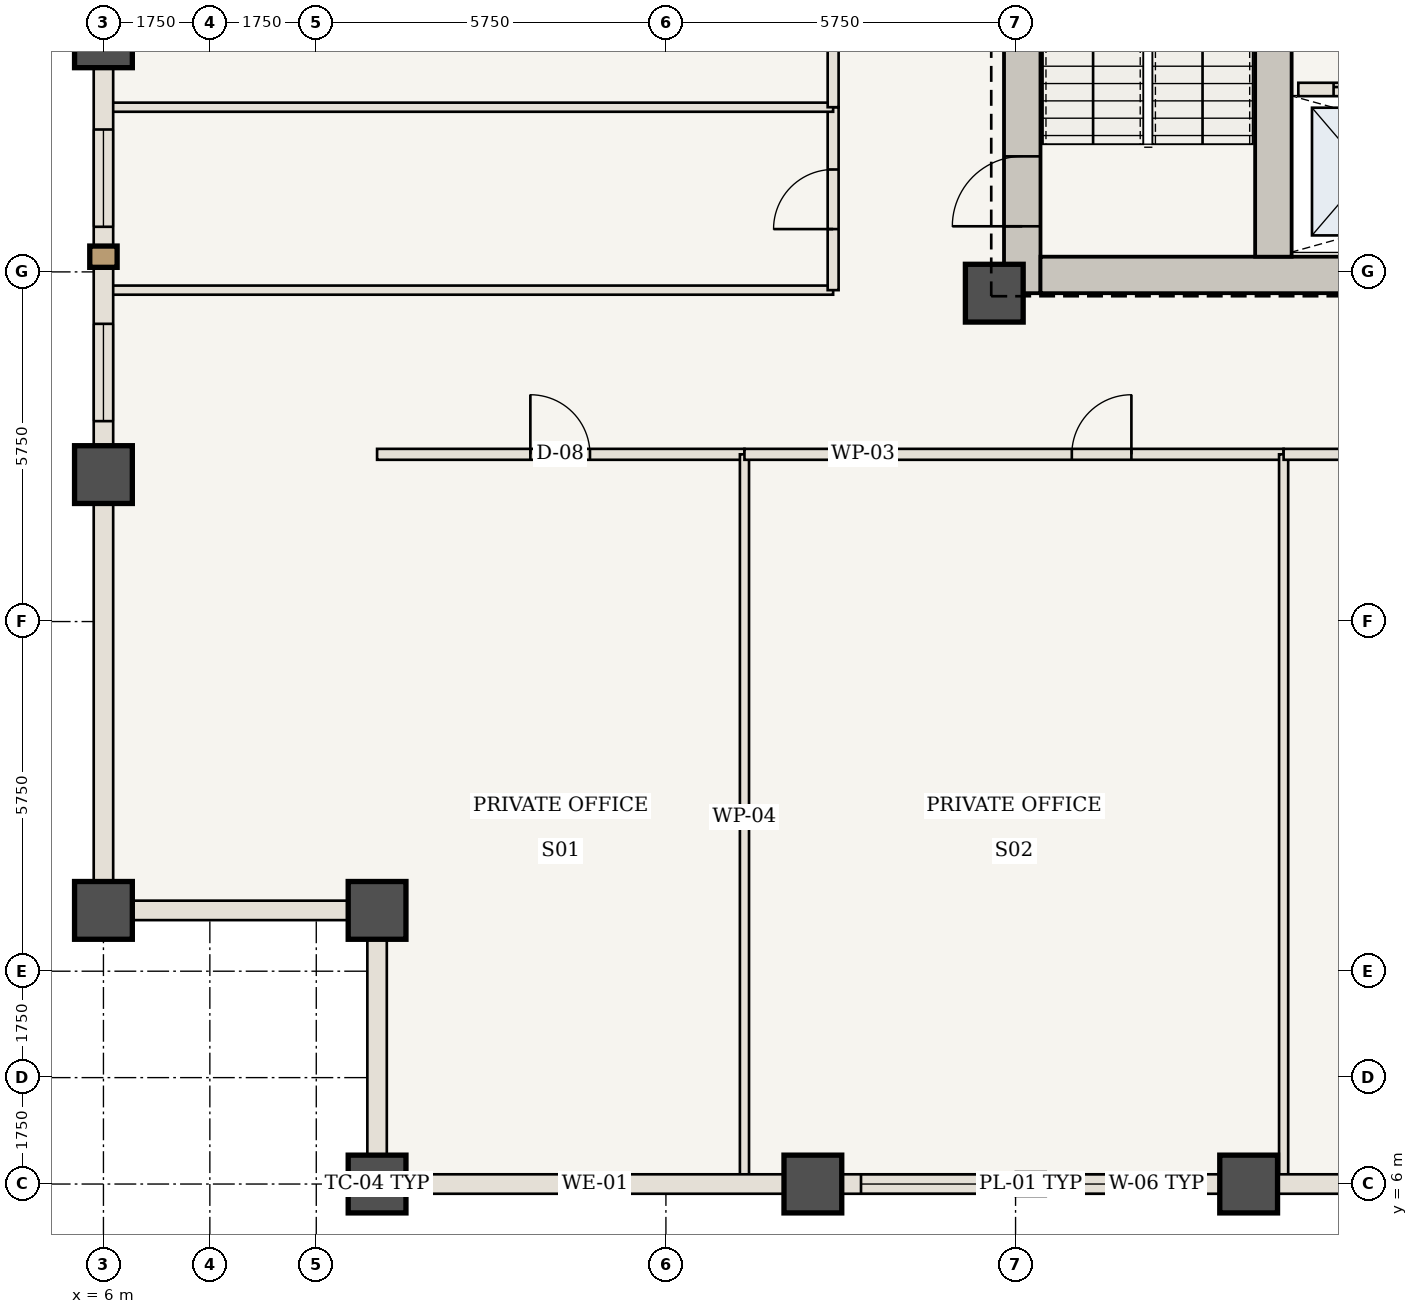
"""IFC4 building model, lengths in metres.
Left out: names, types, materials, properties, quantities, classifications, styles, units other than length and angle.
Written with IfcOpenShell. Run it as: python <this file> out.ifc"""

import sys

from ifc_helpers import new_model, si_unit, direction, frame, frame_2d, origin, origin_2d, place, context, subcontext, project, spatial, rectangle, extrude, element, fill, save


model = new_model("IFC4")
c1 = context("Model", 3, precision=1e-05, world=origin(), true_north=direction((0.0, 1.0)))
c2 = subcontext(c1, "Body", "Model", "MODEL_VIEW")
j1 = project(units=[si_unit("LENGTHUNIT", "METRE"), si_unit("PLANEANGLEUNIT", "RADIAN")], contexts=[c1])
p1 = place(None, origin())
s1 = spatial("IfcSite", under=j1, at=p1, CompositionType="ELEMENT")
p2 = place(p1, origin())
s2 = spatial("IfcBuilding", under=s1, at=p2, CompositionType="ELEMENT")
p3 = place(p2, frame((0.0, 0.0, 129.85)))
s3 = spatial("IfcBuildingStorey", under=s2, at=p3, CompositionType="ELEMENT", Elevation=129.85)
p4 = place(p3, frame((21.11, 20.65, 0.0), z_axis=(0.0, 0.0, 1.0), x_axis=(0.0, 1.0, 0.0)))
e1 = element("IfcWall", 1, at=p4, inside=s3, PredefinedType="SHEAR", context=c2, shape_type="SweptSolid", body=[
    extrude(rectangle(XDim=9.95, YDim=0.6, at=frame_2d((4.975, 0.0))), origin(), (0.0, 0.0, 1.0), 3.85),
])
p5 = place(p4, frame((1.1, 0.0, 0.0)))
e2 = element("IfcOpeningElement", 2, at=p5, cuts=e1, PredefinedType="OPENING", context=c2, shape_type="SweptSolid", body=[
    extrude(rectangle(XDim=1.15, YDim=2.15, at=frame_2d((0.575, 1.075))), frame((0.0, 0.31, 0.0), z_axis=(0.0, -1.0, 0.0), x_axis=(1.0, 0.0, 0.0)), (0.0, 0.0, 1.0), 0.62),
])
p6 = place(p3, frame((21.41, 20.95, 0.0), z_axis=(0.0, 0.0, 1.0), x_axis=(1.0, 0.0, 0.0)))
e3 = element("IfcWall", 3, at=p6, inside=s3, PredefinedType="SHEAR", context=c2, shape_type="SweptSolid", body=[
    extrude(rectangle(XDim=13.74, YDim=0.6, at=frame_2d((6.87, 0.0))), origin(), (0.0, 0.0, 1.0), 3.85),
])
p7 = place(p3, frame((25.24, 21.25, 0.0), z_axis=(0.0, 0.0, 1.0), x_axis=(0.0, 1.0, 0.0)))
e4 = element("IfcWall", 4, at=p7, inside=s3, PredefinedType="SHEAR", context=c2, shape_type="SweptSolid", body=[
    extrude(rectangle(XDim=9.35, YDim=0.6, at=frame_2d((4.675, 0.0))), origin(), (0.0, 0.0, 1.0), 3.85),
])
for number, where, z_axis, x_axis in (
    (5, (20.65, 20.65, 0.0), (0.0, 0.0, 1.0), (1.0, 0.0, 0.0)),
    (6, (10.5, 6.0, 0.0), (0.0, 0.0, 1.0), (1.0, 0.0, 0.0)),
    (7, (10.5, 10.5, 0.0), (0.0, 0.0, 1.0), (1.0, 0.0, 0.0)),
    (8, (6.0, 10.5, 0.0), (0.0, 0.0, 1.0), (1.0, 0.0, 0.0)),
    (9, (17.667, 6.0, 0.0), (0.0, 0.0, 1.0), (1.0, 0.0, 0.0)),
    (10, (6.0, 17.667, 0.0), (0.0, 0.0, 1.0), (1.0, 0.0, 0.0)),
    (11, (24.833, 6.0, 0.0), (0.0, 0.0, 1.0), (1.0, 0.0, 0.0)),
    (12, (6.0, 24.833, 0.0), (0.0, 0.0, 1.0), (1.0, 0.0, 0.0)),
):
    element("IfcColumn", number, at=place(p3, frame(where, z_axis=z_axis, x_axis=x_axis)), inside=s3, PredefinedType="COLUMN", context=c2, shape_type="SweptSolid", body=[
        extrude(rectangle(XDim=0.95, YDim=0.95, at=origin_2d()), origin(), (0.0, 0.0, 1.0), 3.85),
    ])
p8 = place(p3, frame((25.65, 24.0, 0.0), z_axis=(0.0, 0.0, 1.0), x_axis=(1.0, 0.0, 0.0)))
e13 = element("IfcWall", 13, at=p8, inside=s3, PredefinedType="STANDARD", context=c2, shape_type="SweptSolid", body=[
    extrude(rectangle(XDim=9.25, YDim=0.22, at=frame_2d((4.625, 0.0))), origin(), (0.0, 0.0, 1.0), 3.685),
])
p9 = place(p8, frame((0.58, 0.0, 0.0)))
e14 = element("IfcOpeningElement", 14, at=p9, cuts=e13, PredefinedType="OPENING", context=c2, shape_type="SweptSolid", body=[
    extrude(rectangle(XDim=1.1, YDim=2.15, at=frame_2d((0.55, 1.075))), frame((0.0, 0.12, 0.0), z_axis=(0.0, -1.0, 0.0), x_axis=(1.0, 0.0, 0.0)), (0.0, 0.0, 1.0), 0.24),
])
p10 = place(p8, frame((2.75, 0.0, 0.0)))
e15 = element("IfcOpeningElement", 15, at=p10, cuts=e13, PredefinedType="OPENING", context=c2, shape_type="SweptSolid", body=[
    extrude(rectangle(XDim=1.1, YDim=2.15, at=frame_2d((0.55, 1.075))), frame((0.0, 0.12, 0.0), z_axis=(0.0, -1.0, 0.0), x_axis=(1.0, 0.0, 0.0)), (0.0, 0.0, 1.0), 0.24),
])
p11 = place(p8, frame((5.05, 0.0, 0.0)))
e16 = element("IfcOpeningElement", 16, at=p11, cuts=e13, PredefinedType="OPENING", context=c2, shape_type="SweptSolid", body=[
    extrude(rectangle(XDim=1.1, YDim=2.15, at=frame_2d((0.55, 1.075))), frame((0.0, 0.12, 0.0), z_axis=(0.0, -1.0, 0.0), x_axis=(1.0, 0.0, 0.0)), (0.0, 0.0, 1.0), 0.24),
])
p12 = place(p8, frame((7.35, 0.0, 0.0)))
e17 = element("IfcOpeningElement", 17, at=p12, cuts=e13, PredefinedType="OPENING", context=c2, shape_type="SweptSolid", body=[
    extrude(rectangle(XDim=1.1, YDim=2.15, at=frame_2d((0.55, 1.075))), frame((0.0, 0.12, 0.0), z_axis=(0.0, -1.0, 0.0), x_axis=(1.0, 0.0, 0.0)), (0.0, 0.0, 1.0), 0.24),
])
p13 = place(p3, frame((10.5, 18.0, 0.0), z_axis=(0.0, 0.0, 1.0), x_axis=(1.0, 0.0, 0.0)))
e18 = element("IfcWall", 18, at=p13, inside=s3, PredefinedType="STANDARD", context=c2, shape_type="SweptSolid", body=[
    extrude(rectangle(XDim=6.042, YDim=0.18, at=frame_2d((3.021, 0.0))), origin(), (0.0, 0.0, 1.0), 3.685),
])
p14 = place(p13, frame((2.521, 0.0, 0.0)))
e19 = element("IfcOpeningElement", 19, at=p14, cuts=e18, PredefinedType="OPENING", context=c2, shape_type="SweptSolid", body=[
    extrude(rectangle(XDim=0.98, YDim=2.2, at=frame_2d((0.49, 1.1))), frame((0.0, 0.1, 0.0), z_axis=(0.0, -1.0, 0.0), x_axis=(1.0, 0.0, 0.0)), (0.0, 0.0, 1.0), 0.2),
])
p15 = place(p3, frame((16.542, 6.06, 0.0), z_axis=(0.0, 0.0, 1.0), x_axis=(0.0, 1.0, 0.0)))
e20 = element("IfcWall", 20, at=p15, inside=s3, PredefinedType="STANDARD", context=c2, shape_type="SweptSolid", body=[
    extrude(rectangle(XDim=11.94, YDim=0.15, at=frame_2d((5.97, 0.0))), origin(), (0.0, 0.0, 1.0), 3.685),
])
p16 = place(p3, frame((16.542, 18.0, 0.0), z_axis=(0.0, 0.0, 1.0), x_axis=(1.0, 0.0, 0.0)))
e21 = element("IfcWall", 21, at=p16, inside=s3, PredefinedType="STANDARD", context=c2, shape_type="SweptSolid", body=[
    extrude(rectangle(XDim=8.866, YDim=0.18, at=frame_2d((4.433, 0.0))), origin(), (0.0, 0.0, 1.0), 3.685),
])
p17 = place(p16, frame((5.383, 0.0, 0.0)))
e22 = element("IfcOpeningElement", 22, at=p17, cuts=e21, PredefinedType="OPENING", context=c2, shape_type="SweptSolid", body=[
    extrude(rectangle(XDim=0.98, YDim=2.2, at=frame_2d((0.49, 1.1))), frame((0.0, 0.1, 0.0), z_axis=(0.0, -1.0, 0.0), x_axis=(1.0, 0.0, 0.0)), (0.0, 0.0, 1.0), 0.2),
])
p18 = place(p3, frame((25.408, 6.06, 0.0), z_axis=(0.0, 0.0, 1.0), x_axis=(0.0, 1.0, 0.0)))
e23 = element("IfcWall", 23, at=p18, inside=s3, PredefinedType="STANDARD", context=c2, shape_type="SweptSolid", body=[
    extrude(rectangle(XDim=11.94, YDim=0.15, at=frame_2d((5.97, 0.0))), origin(), (0.0, 0.0, 1.0), 3.685),
])
p19 = place(p3, frame((25.408, 18.0, 0.0), z_axis=(0.0, 0.0, 1.0), x_axis=(1.0, 0.0, 0.0)))
e24 = element("IfcWall", 24, at=p19, inside=s3, PredefinedType="STANDARD", context=c2, shape_type="SweptSolid", body=[
    extrude(rectangle(XDim=5.917, YDim=0.18, at=frame_2d((2.958, 0.0))), origin(), (0.0, 0.0, 1.0), 3.685),
])
p20 = place(p19, frame((1.008, 0.0, 0.0)))
e25 = element("IfcOpeningElement", 25, at=p20, cuts=e24, PredefinedType="OPENING", context=c2, shape_type="SweptSolid", body=[
    extrude(rectangle(XDim=0.98, YDim=2.2, at=frame_2d((0.49, 1.1))), frame((0.0, 0.1, 0.0), z_axis=(0.0, -1.0, 0.0), x_axis=(1.0, 0.0, 0.0)), (0.0, 0.0, 1.0), 0.2),
])
p21 = place(p3, frame((6.06, 20.7, 0.0), z_axis=(0.0, 0.0, 1.0), x_axis=(1.0, 0.0, 0.0)))
e26 = element("IfcWall", 26, at=p21, inside=s3, PredefinedType="STANDARD", context=c2, shape_type="SweptSolid", body=[
    extrude(rectangle(XDim=11.94, YDim=0.15, at=frame_2d((5.97, 0.0))), origin(), (0.0, 0.0, 1.0), 3.065),
])
p22 = place(p3, frame((18.0, 20.7, 0.0), z_axis=(0.0, 0.0, 1.0), x_axis=(0.0, 1.0, 0.0)))
e27 = element("IfcWall", 27, at=p22, inside=s3, PredefinedType="STANDARD", context=c2, shape_type="SweptSolid", body=[
    extrude(rectangle(XDim=3.008, YDim=0.18, at=frame_2d((1.504, 0.0))), origin(), (0.0, 0.0, 1.0), 3.685),
])
p23 = place(p22, frame((1.004, 0.0, 0.0)))
e28 = element("IfcOpeningElement", 28, at=p23, cuts=e27, PredefinedType="OPENING", context=c2, shape_type="SweptSolid", body=[
    extrude(rectangle(XDim=0.98, YDim=2.2, at=frame_2d((0.49, 1.1))), frame((0.0, 0.1, 0.0), z_axis=(0.0, -1.0, 0.0), x_axis=(1.0, 0.0, 0.0)), (0.0, 0.0, 1.0), 0.2),
])
p24 = place(p3, frame((6.06, 23.708, 0.0), z_axis=(0.0, 0.0, 1.0), x_axis=(1.0, 0.0, 0.0)))
e29 = element("IfcWall", 29, at=p24, inside=s3, PredefinedType="STANDARD", context=c2, shape_type="SweptSolid", body=[
    extrude(rectangle(XDim=11.94, YDim=0.15, at=frame_2d((5.97, 0.0))), origin(), (0.0, 0.0, 1.0), 3.685),
])
p25 = place(p3, frame((18.0, 23.708, 0.0), z_axis=(0.0, 0.0, 1.0), x_axis=(0.0, 1.0, 0.0)))
e30 = element("IfcWall", 30, at=p25, inside=s3, PredefinedType="STANDARD", context=c2, shape_type="SweptSolid", body=[
    extrude(rectangle(XDim=16.033, YDim=0.18, at=frame_2d((8.017, 0.0))), origin(), (0.0, 0.0, 1.0), 3.685),
])
p26 = place(p25, frame((8.967, 0.0, 0.0)))
e31 = element("IfcOpeningElement", 31, at=p26, cuts=e30, PredefinedType="OPENING", context=c2, shape_type="SweptSolid", body=[
    extrude(rectangle(XDim=0.98, YDim=2.2, at=frame_2d((0.49, 1.1))), frame((0.0, 0.1, 0.0), z_axis=(0.0, -1.0, 0.0), x_axis=(1.0, 0.0, 0.0)), (0.0, 0.0, 1.0), 0.2),
])
p27 = place(p3, frame((17.667, 6.0, 0.0), z_axis=(0.0, 0.0, 1.0), x_axis=(-1.0, 0.0, 0.0)))
e32 = element("IfcWall", 32, at=p27, inside=s3, PredefinedType="USERDEFINED", context=c2, shape_type="SweptSolid", body=[
    extrude(rectangle(XDim=7.167, YDim=0.32, at=frame_2d((3.583, 0.0))), origin(), (0.0, 0.0, 1.0), 2.885),
])
p28 = place(p3, frame((24.833, 6.0, 0.0), z_axis=(0.0, 0.0, 1.0), x_axis=(-1.0, 0.0, 0.0)))
e33 = element("IfcWall", 33, at=p28, inside=s3, PredefinedType="USERDEFINED", context=c2, shape_type="SweptSolid", body=[
    extrude(rectangle(XDim=7.167, YDim=0.32, at=frame_2d((3.583, 0.0))), origin(), (0.0, 0.0, 1.0), 2.885),
])
p29 = place(p28, frame((0.792, 0.0, 0.85)))
e34 = element("IfcOpeningElement", 34, at=p29, cuts=e33, PredefinedType="OPENING", context=c2, shape_type="SweptSolid", body=[
    extrude(rectangle(XDim=2.2, YDim=1.835, at=frame_2d((1.1, 0.917))), frame((0.0, 0.17, 0.0), z_axis=(0.0, -1.0, 0.0), x_axis=(1.0, 0.0, 0.0)), (0.0, 0.0, 1.0), 0.34),
])
p30 = place(p28, frame((4.175, 0.0, 0.85)))
e35 = element("IfcOpeningElement", 35, at=p30, cuts=e33, PredefinedType="OPENING", context=c2, shape_type="SweptSolid", body=[
    extrude(rectangle(XDim=2.2, YDim=1.835, at=frame_2d((1.1, 0.917))), frame((0.0, 0.17, 0.0), z_axis=(0.0, -1.0, 0.0), x_axis=(1.0, 0.0, 0.0)), (0.0, 0.0, 1.0), 0.34),
])
p31 = place(p3, frame((32.0, 6.0, 0.0), z_axis=(0.0, 0.0, 1.0), x_axis=(-1.0, 0.0, 0.0)))
e36 = element("IfcWall", 36, at=p31, inside=s3, PredefinedType="USERDEFINED", context=c2, shape_type="SweptSolid", body=[
    extrude(rectangle(XDim=7.167, YDim=0.32, at=frame_2d((3.583, 0.0))), origin(), (0.0, 0.0, 1.0), 2.885),
])
p32 = place(p31, frame((2.133, 0.0, 0.85)))
e37 = element("IfcOpeningElement", 37, at=p32, cuts=e36, PredefinedType="OPENING", context=c2, shape_type="SweptSolid", body=[
    extrude(rectangle(XDim=3.0, YDim=1.835, at=frame_2d((1.5, 0.917))), frame((0.0, 0.17, 0.0), z_axis=(0.0, -1.0, 0.0), x_axis=(1.0, 0.0, 0.0)), (0.0, 0.0, 1.0), 0.34),
])
p33 = place(p3, frame((6.0, 10.5, 0.0), z_axis=(0.0, 0.0, 1.0), x_axis=(0.0, 1.0, 0.0)))
e38 = element("IfcWall", 38, at=p33, inside=s3, PredefinedType="USERDEFINED", context=c2, shape_type="SweptSolid", body=[
    extrude(rectangle(XDim=7.167, YDim=0.32, at=frame_2d((3.583, 0.0))), origin(), (0.0, 0.0, 1.0), 2.885),
])
p34 = place(p3, frame((6.0, 17.667, 0.0), z_axis=(0.0, 0.0, 1.0), x_axis=(0.0, 1.0, 0.0)))
e39 = element("IfcWall", 39, at=p34, inside=s3, PredefinedType="USERDEFINED", context=c2, shape_type="SweptSolid", body=[
    extrude(rectangle(XDim=7.167, YDim=0.32, at=frame_2d((3.583, 0.0))), origin(), (0.0, 0.0, 1.0), 2.885),
])
p35 = place(p34, frame((0.879, 0.0, 0.85)))
e40 = element("IfcOpeningElement", 40, at=p35, cuts=e39, PredefinedType="OPENING", context=c2, shape_type="SweptSolid", body=[
    extrude(rectangle(XDim=1.6, YDim=1.835, at=frame_2d((0.8, 0.917))), frame((0.0, 0.17, 0.0), z_axis=(0.0, -1.0, 0.0), x_axis=(1.0, 0.0, 0.0)), (0.0, 0.0, 1.0), 0.34),
])
p36 = place(p34, frame((4.075, 0.0, 0.85)))
e41 = element("IfcOpeningElement", 41, at=p36, cuts=e39, PredefinedType="OPENING", context=c2, shape_type="SweptSolid", body=[
    extrude(rectangle(XDim=1.6, YDim=1.835, at=frame_2d((0.8, 0.917))), frame((0.0, 0.17, 0.0), z_axis=(0.0, -1.0, 0.0), x_axis=(1.0, 0.0, 0.0)), (0.0, 0.0, 1.0), 0.34),
])
for number, where, z_axis, x_axis in (
    (42, (10.5, 6.0, 0.0), (0.0, 0.0, 1.0), (0.0, 1.0, 0.0)),
    (43, (10.5, 10.5, 0.0), (0.0, 0.0, 1.0), (-1.0, 0.0, 0.0)),
):
    element("IfcWall", number, at=place(p3, frame(where, z_axis=z_axis, x_axis=x_axis)), inside=s3, PredefinedType="USERDEFINED", context=c2, shape_type="SweptSolid", body=[
        extrude(rectangle(XDim=4.5, YDim=0.32, at=frame_2d((2.25, 0.0))), origin(), (0.0, 0.0, 1.0), 2.885),
    ])
p37 = place(p5, origin())
e44 = element("IfcDoor", 44, at=p37, inside=s3, OperationType="SINGLE_SWING_LEFT", PredefinedType="DOOR", context=c2, shape_type="SweptSolid", body=[
    extrude(rectangle(XDim=1.15, YDim=2.15, at=frame_2d((0.575, 1.075))), frame((0.0, 0.025, 0.0), z_axis=(0.0, -1.0, 0.0), x_axis=(1.0, 0.0, 0.0)), (0.0, 0.0, 1.0), 0.05),
])
fill(e2, e44)
p38 = place(p9, origin())
e45 = element("IfcDoor", 45, at=p38, inside=s3, OperationType="DOUBLE_DOOR_SLIDING", PredefinedType="DOOR", context=c2, shape_type="SweptSolid", body=[
    extrude(rectangle(XDim=1.1, YDim=2.15, at=frame_2d((0.55, 1.075))), frame((0.0, 0.025, 0.0), z_axis=(0.0, -1.0, 0.0), x_axis=(1.0, 0.0, 0.0)), (0.0, 0.0, 1.0), 0.05),
])
fill(e14, e45)
p39 = place(p14, origin())
e46 = element("IfcDoor", 46, at=p39, inside=s3, OperationType="SINGLE_SWING_LEFT", PredefinedType="DOOR", context=c2, shape_type="SweptSolid", body=[
    extrude(rectangle(XDim=0.98, YDim=2.2, at=frame_2d((0.49, 1.1))), frame((0.0, 0.025, 0.0), z_axis=(0.0, -1.0, 0.0), x_axis=(1.0, 0.0, 0.0)), (0.0, 0.0, 1.0), 0.05),
])
fill(e19, e46)
p40 = place(p17, origin())
e47 = element("IfcDoor", 47, at=p40, inside=s3, OperationType="SINGLE_SWING_RIGHT", PredefinedType="DOOR", context=c2, shape_type="SweptSolid", body=[
    extrude(rectangle(XDim=0.98, YDim=2.2, at=frame_2d((0.49, 1.1))), frame((0.0, 0.025, 0.0), z_axis=(0.0, -1.0, 0.0), x_axis=(1.0, 0.0, 0.0)), (0.0, 0.0, 1.0), 0.05),
])
fill(e22, e47)
p41 = place(p23, origin())
e48 = element("IfcDoor", 48, at=p41, inside=s3, OperationType="SINGLE_SWING_LEFT", PredefinedType="DOOR", context=c2, shape_type="SweptSolid", body=[
    extrude(rectangle(XDim=0.98, YDim=2.2, at=frame_2d((0.49, 1.1))), frame((0.0, 0.025, 0.0), z_axis=(0.0, -1.0, 0.0), x_axis=(1.0, 0.0, 0.0)), (0.0, 0.0, 1.0), 0.05),
])
fill(e28, e48)
p42 = place(p29, origin())
e49 = element("IfcWindow", 49, at=p42, inside=s3, PartitioningType="SINGLE_PANEL", PredefinedType="WINDOW", context=c2, shape_type="SweptSolid", body=[
    extrude(rectangle(XDim=2.2, YDim=1.835, at=frame_2d((1.1, 0.917))), frame((0.0, 0.03, 0.0), z_axis=(0.0, -1.0, 0.0), x_axis=(1.0, 0.0, 0.0)), (0.0, 0.0, 1.0), 0.06),
])
fill(e34, e49)
p43 = place(p30, origin())
e50 = element("IfcWindow", 50, at=p43, inside=s3, PartitioningType="SINGLE_PANEL", PredefinedType="WINDOW", context=c2, shape_type="SweptSolid", body=[
    extrude(rectangle(XDim=2.2, YDim=1.835, at=frame_2d((1.1, 0.917))), frame((0.0, 0.03, 0.0), z_axis=(0.0, -1.0, 0.0), x_axis=(1.0, 0.0, 0.0)), (0.0, 0.0, 1.0), 0.06),
])
fill(e35, e50)
p44 = place(p35, origin())
e51 = element("IfcWindow", 51, at=p44, inside=s3, PartitioningType="SINGLE_PANEL", PredefinedType="WINDOW", context=c2, shape_type="SweptSolid", body=[
    extrude(rectangle(XDim=1.6, YDim=1.835, at=frame_2d((0.8, 0.917))), frame((0.0, 0.03, 0.0), z_axis=(0.0, -1.0, 0.0), x_axis=(1.0, 0.0, 0.0)), (0.0, 0.0, 1.0), 0.06),
])
fill(e40, e51)
p45 = place(p36, origin())
e52 = element("IfcWindow", 52, at=p45, inside=s3, PartitioningType="SINGLE_PANEL", PredefinedType="WINDOW", context=c2, shape_type="SweptSolid", body=[
    extrude(rectangle(XDim=1.6, YDim=1.835, at=frame_2d((0.8, 0.917))), frame((0.0, 0.03, 0.0), z_axis=(0.0, -1.0, 0.0), x_axis=(1.0, 0.0, 0.0)), (0.0, 0.0, 1.0), 0.06),
])
fill(e41, e52)
save(model, sys.argv[1])
